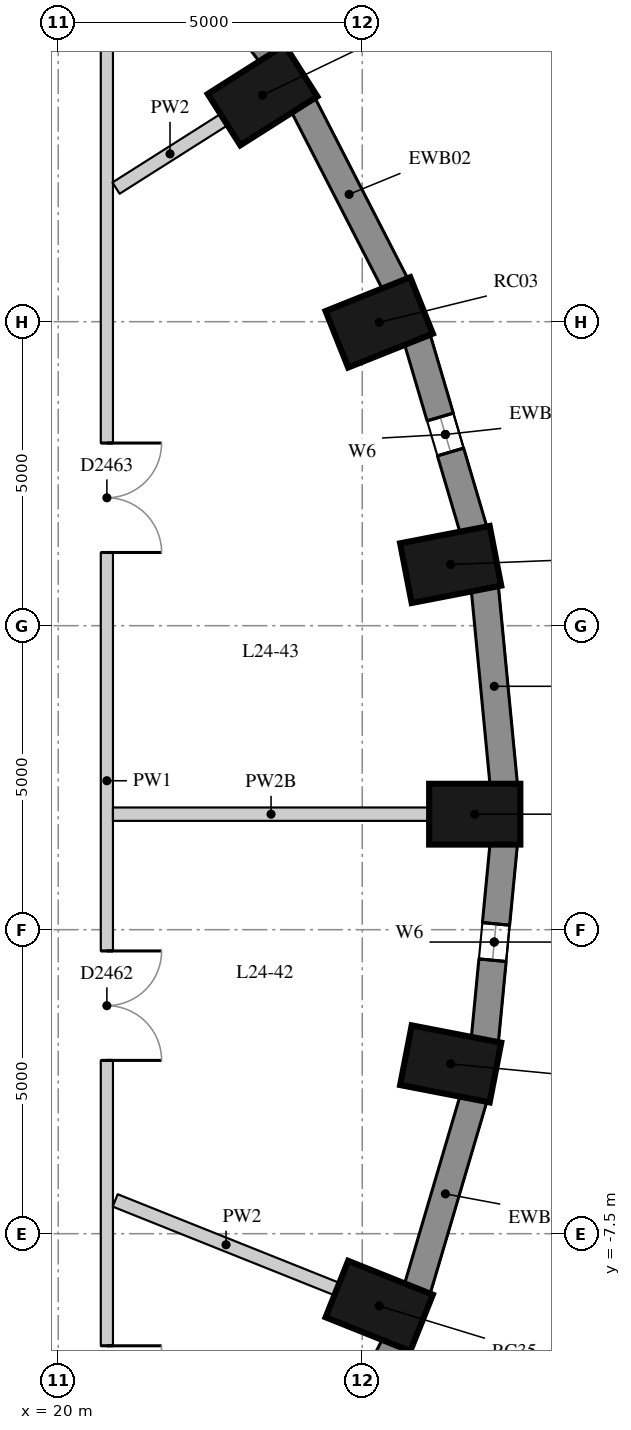
"""IFC4 building model, lengths in metres.
Left out: names, types, materials, properties, quantities, classifications, styles, units other than length and angle.
Written with IfcOpenShell. Run it as: python <this file> out.ifc"""

import sys

from ifc_helpers import new_model, si_unit, direction, frame, frame_2d, origin, origin_2d, place, context, subcontext, project, spatial, rectangle, extrude, element, fill, save


model = new_model("IFC4")
c1 = context("Model", 3, precision=1e-05, world=origin(), true_north=direction((0.0, 1.0)))
c2 = subcontext(c1, "Body", "Model", "MODEL_VIEW")
j1 = project(units=[si_unit("LENGTHUNIT", "METRE"), si_unit("PLANEANGLEUNIT", "RADIAN")], contexts=[c1])
p1 = place(None, origin())
s1 = spatial("IfcSite", under=j1, at=p1, CompositionType="ELEMENT")
p2 = place(p1, origin())
s2 = spatial("IfcBuilding", under=s1, at=p2, CompositionType="ELEMENT")
p3 = place(p2, frame((0.0, 0.0, 88.9)))
s3 = spatial("IfcBuildingStorey", under=s2, at=p3, CompositionType="ELEMENT", Elevation=88.9)
for number, where, z_axis, x_axis in (
    (1, (26.85, -0.6, 0.0), (0.0, 0.0, 1.0), (1.0, 0.0, 0.0)),
    (2, (26.454, 3.507, 0.0), (0.0, 0.0, 1.0), (0.982, 0.19, 0.0)),
    (3, (25.279, 7.489, 0.0), (0.0, 0.0, 1.0), (0.929, 0.371, 0.0)),
    (4, (23.36, 11.225, 0.0), (0.0, 0.0, 1.0), (0.845, 0.536, 0.0)),
    (5, (25.279, -8.689, 0.0), (0.0, 0.0, 1.0), (0.929, -0.371, 0.0)),
    (6, (26.454, -4.707, 0.0), (0.0, 0.0, 1.0), (0.982, -0.19, 0.0)),
):
    element("IfcColumn", number, at=place(p3, frame(where, z_axis=z_axis, x_axis=x_axis)), inside=s3, PredefinedType="COLUMN", context=c2, shape_type="SweptSolid", body=[
        extrude(rectangle(XDim=1.5, YDim=1.0, at=origin_2d()), origin(), (0.0, 0.0, 1.0), 3.3),
    ])
p4 = place(p3, frame((27.328, -0.12, 0.0), z_axis=(0.0, 0.0, 1.0), x_axis=(-0.09589355735, 0.995391594127, 0.0)))
e7 = element("IfcWall", 7, at=p4, inside=s3, PredefinedType="SOLIDWALL", context=c2, shape_type="SweptSolid", body=[
    extrude(rectangle(XDim=3.261, YDim=0.45, at=frame_2d((1.631, 0.0))), origin(), (0.0, 0.0, 1.0), 3.02),
])
p5 = place(p3, frame((26.832, 4.069, 0.0), z_axis=(0.0, 0.0, 1.0), x_axis=(-0.283002902729, 0.959119052593, 0.0)))
e8 = element("IfcWall", 8, at=p5, inside=s3, PredefinedType="SOLIDWALL", context=c2, shape_type="SweptSolid", body=[
    extrude(rectangle(XDim=3.286, YDim=0.45, at=frame_2d((1.643, 0.0))), origin(), (0.0, 0.0, 1.0), 3.02),
])
p6 = place(p5, frame((1.343, 0.0, 0.4)))
e9 = element("IfcOpeningElement", 9, at=p6, cuts=e8, PredefinedType="OPENING", context=c2, shape_type="SweptSolid", body=[
    extrude(rectangle(XDim=0.6, YDim=1.75, at=frame_2d((0.3, 0.875))), frame((0.0, 0.235, 0.0), z_axis=(0.0, -1.0, 0.0), x_axis=(1.0, 0.0, 0.0)), (0.0, 0.0, 1.0), 0.47),
])
p7 = place(p3, frame((25.545, 8.112, 0.0), z_axis=(0.0, 0.0, 1.0), x_axis=(-0.456828186229, 0.889554949549, 0.0)))
e10 = element("IfcWall", 10, at=p7, inside=s3, PredefinedType="SOLIDWALL", context=c2, shape_type="SweptSolid", body=[
    extrude(rectangle(XDim=3.333, YDim=0.45, at=frame_2d((1.667, 0.0))), origin(), (0.0, 0.0, 1.0), 3.02),
])
p8 = place(p3, frame((23.508, 11.887, 0.0), z_axis=(0.0, 0.0, 1.0), x_axis=(-0.610693945156, 0.791866721961, 0.0)))
e11 = element("IfcWall", 11, at=p8, inside=s3, PredefinedType="SOLIDWALL", context=c2, shape_type="SweptSolid", body=[
    extrude(rectangle(XDim=3.395, YDim=0.45, at=frame_2d((1.697, 0.0))), origin(), (0.0, 0.0, 1.0), 3.02),
])
p9 = place(p8, frame((1.397, 0.0, 0.4)))
e12 = element("IfcOpeningElement", 12, at=p9, cuts=e11, PredefinedType="OPENING", context=c2, shape_type="SweptSolid", body=[
    extrude(rectangle(XDim=0.6, YDim=1.75, at=frame_2d((0.3, 0.875))), frame((0.0, 0.235, 0.0), z_axis=(0.0, -1.0, 0.0), x_axis=(1.0, 0.0, 0.0)), (0.0, 0.0, 1.0), 0.47),
])
p10 = place(p3, frame((24.023, -12.277, 0.0), z_axis=(0.0, 0.0, 1.0), x_axis=(0.456828186229, 0.889554949549, 0.0)))
e13 = element("IfcWall", 13, at=p10, inside=s3, PredefinedType="SOLIDWALL", context=c2, shape_type="SweptSolid", body=[
    extrude(rectangle(XDim=3.333, YDim=0.45, at=frame_2d((1.667, 0.0))), origin(), (0.0, 0.0, 1.0), 3.02),
])
p11 = place(p10, frame((1.366, 0.0, 0.4)))
e14 = element("IfcOpeningElement", 14, at=p11, cuts=e13, PredefinedType="OPENING", context=c2, shape_type="SweptSolid", body=[
    extrude(rectangle(XDim=0.6, YDim=1.75, at=frame_2d((0.3, 0.875))), frame((0.0, 0.235, 0.0), z_axis=(0.0, -1.0, 0.0), x_axis=(1.0, 0.0, 0.0)), (0.0, 0.0, 1.0), 0.47),
])
p12 = place(p3, frame((25.902, -8.421, 0.0), z_axis=(0.0, 0.0, 1.0), x_axis=(0.282982737009, 0.95912500257, 0.0)))
e15 = element("IfcWall", 15, at=p12, inside=s3, PredefinedType="SOLIDWALL", context=c2, shape_type="SweptSolid", body=[
    extrude(rectangle(XDim=3.286, YDim=0.45, at=frame_2d((1.643, 0.0))), origin(), (0.0, 0.0, 1.0), 3.02),
])
p13 = place(p3, frame((27.015, -4.326, 0.0), z_axis=(0.0, 0.0, 1.0), x_axis=(0.09589355735, 0.995391594127, 0.0)))
e16 = element("IfcWall", 16, at=p13, inside=s3, PredefinedType="SOLIDWALL", context=c2, shape_type="SweptSolid", body=[
    extrude(rectangle(XDim=3.261, YDim=0.45, at=frame_2d((1.631, 0.0))), origin(), (0.0, 0.0, 1.0), 3.02),
])
p14 = place(p13, frame((1.331, 0.0, 0.4)))
e17 = element("IfcOpeningElement", 17, at=p14, cuts=e16, PredefinedType="OPENING", context=c2, shape_type="SweptSolid", body=[
    extrude(rectangle(XDim=0.6, YDim=1.75, at=frame_2d((0.3, 0.875))), frame((0.0, 0.235, 0.0), z_axis=(0.0, -1.0, 0.0), x_axis=(1.0, 0.0, 0.0)), (0.0, 0.0, 1.0), 0.47),
])
p15 = place(p3, frame((20.8, 13.5, 0.0), z_axis=(0.0, 0.0, 1.0), x_axis=(0.0, -1.0, 0.0)))
e18 = element("IfcWall", 18, at=p15, inside=s3, PredefinedType="PARTITIONING", context=c2, shape_type="SweptSolid", body=[
    extrude(rectangle(XDim=27.1, YDim=0.2, at=frame_2d((13.55, 0.0))), origin(), (0.0, 0.0, 1.0), 3.02),
])
p16 = place(p15, frame((22.844, 0.0, 0.0)))
e19 = element("IfcOpeningElement", 19, at=p16, cuts=e18, PredefinedType="OPENING", context=c2, shape_type="SweptSolid", body=[
    extrude(rectangle(XDim=1.8, YDim=2.1, at=frame_2d((0.9, 1.05))), frame((0.0, 0.11, 0.0), z_axis=(0.0, -1.0, 0.0), x_axis=(1.0, 0.0, 0.0)), (0.0, 0.0, 1.0), 0.22),
])
p17 = place(p15, frame((16.35, 0.0, 0.0)))
e20 = element("IfcOpeningElement", 20, at=p17, cuts=e18, PredefinedType="OPENING", context=c2, shape_type="SweptSolid", body=[
    extrude(rectangle(XDim=1.8, YDim=2.1, at=frame_2d((0.9, 1.05))), frame((0.0, 0.11, 0.0), z_axis=(0.0, -1.0, 0.0), x_axis=(1.0, 0.0, 0.0)), (0.0, 0.0, 1.0), 0.22),
])
p18 = place(p15, frame((7.996, 0.0, 0.0)))
e21 = element("IfcOpeningElement", 21, at=p18, cuts=e18, PredefinedType="OPENING", context=c2, shape_type="SweptSolid", body=[
    extrude(rectangle(XDim=1.8, YDim=2.1, at=frame_2d((0.9, 1.05))), frame((0.0, 0.11, 0.0), z_axis=(0.0, -1.0, 0.0), x_axis=(1.0, 0.0, 0.0)), (0.0, 0.0, 1.0), 0.22),
])
p19 = place(p3, frame((26.1, -0.6, 0.0), z_axis=(0.0, 0.0, 1.0), x_axis=(-1.0, 0.0, 0.0)))
e22 = element("IfcWall", 22, at=p19, inside=s3, PredefinedType="PARTITIONING", context=c2, shape_type="SweptSolid", body=[
    extrude(rectangle(XDim=5.2, YDim=0.22, at=frame_2d((2.6, 0.0))), origin(), (0.0, 0.0, 1.0), 2.57),
])
p20 = place(p3, frame((22.727, 10.823, 0.0), z_axis=(0.0, 0.0, 1.0), x_axis=(-0.844549560094, -0.53547739499, 0.0)))
e23 = element("IfcWall", 23, at=p20, inside=s3, PredefinedType="PARTITIONING", context=c2, shape_type="SweptSolid", body=[
    extrude(rectangle(XDim=2.103, YDim=0.22, at=frame_2d((1.051, 0.0))), origin(), (0.0, 0.0, 1.0), 3.02),
])
p21 = place(p3, frame((24.583, -8.41, 0.0), z_axis=(0.0, 0.0, 1.0), x_axis=(-0.928528147853, 0.371262008083, 0.0)))
e24 = element("IfcWall", 24, at=p21, inside=s3, PredefinedType="PARTITIONING", context=c2, shape_type="SweptSolid", body=[
    extrude(rectangle(XDim=3.926, YDim=0.22, at=frame_2d((1.963, 0.0))), origin(), (0.0, 0.0, 1.0), 3.02),
])
p22 = place(p6, origin())
e25 = element("IfcWindow", 25, at=p22, inside=s3, PartitioningType="SINGLE_PANEL", PredefinedType="WINDOW", context=c2, shape_type="SweptSolid", body=[
    extrude(rectangle(XDim=0.6, YDim=1.75, at=frame_2d((0.3, 0.875))), frame((0.0, 0.035, 0.0), z_axis=(0.0, -1.0, 0.0), x_axis=(1.0, 0.0, 0.0)), (0.0, 0.0, 1.0), 0.06),
])
fill(e9, e25)
p23 = place(p14, origin())
e26 = element("IfcWindow", 26, at=p23, inside=s3, PartitioningType="SINGLE_PANEL", PredefinedType="WINDOW", context=c2, shape_type="SweptSolid", body=[
    extrude(rectangle(XDim=0.6, YDim=1.75, at=frame_2d((0.3, 0.875))), frame((0.0, 0.035, 0.0), z_axis=(0.0, -1.0, 0.0), x_axis=(1.0, 0.0, 0.0)), (0.0, 0.0, 1.0), 0.06),
])
fill(e17, e26)
p24 = place(p16, origin())
e27 = element("IfcDoor", 27, at=p24, inside=s3, OperationType="DOUBLE_DOOR_SINGLE_SWING", PredefinedType="DOOR", context=c2, shape_type="SweptSolid", body=[
    extrude(rectangle(XDim=1.8, YDim=2.1, at=frame_2d((0.9, 1.05))), frame((0.0, 0.025, 0.0), z_axis=(0.0, -1.0, 0.0), x_axis=(1.0, 0.0, 0.0)), (0.0, 0.0, 1.0), 0.05),
])
fill(e19, e27)
p25 = place(p17, origin())
e28 = element("IfcDoor", 28, at=p25, inside=s3, OperationType="DOUBLE_DOOR_SINGLE_SWING", PredefinedType="DOOR", context=c2, shape_type="SweptSolid", body=[
    extrude(rectangle(XDim=1.8, YDim=2.1, at=frame_2d((0.9, 1.05))), frame((0.0, 0.025, 0.0), z_axis=(0.0, -1.0, 0.0), x_axis=(1.0, 0.0, 0.0)), (0.0, 0.0, 1.0), 0.05),
])
fill(e20, e28)
p26 = place(p18, origin())
e29 = element("IfcDoor", 29, at=p26, inside=s3, OperationType="DOUBLE_DOOR_SINGLE_SWING", PredefinedType="DOOR", context=c2, shape_type="SweptSolid", body=[
    extrude(rectangle(XDim=1.8, YDim=2.1, at=frame_2d((0.9, 1.05))), frame((0.0, 0.025, 0.0), z_axis=(0.0, -1.0, 0.0), x_axis=(1.0, 0.0, 0.0)), (0.0, 0.0, 1.0), 0.05),
])
fill(e21, e29)
save(model, sys.argv[1])
